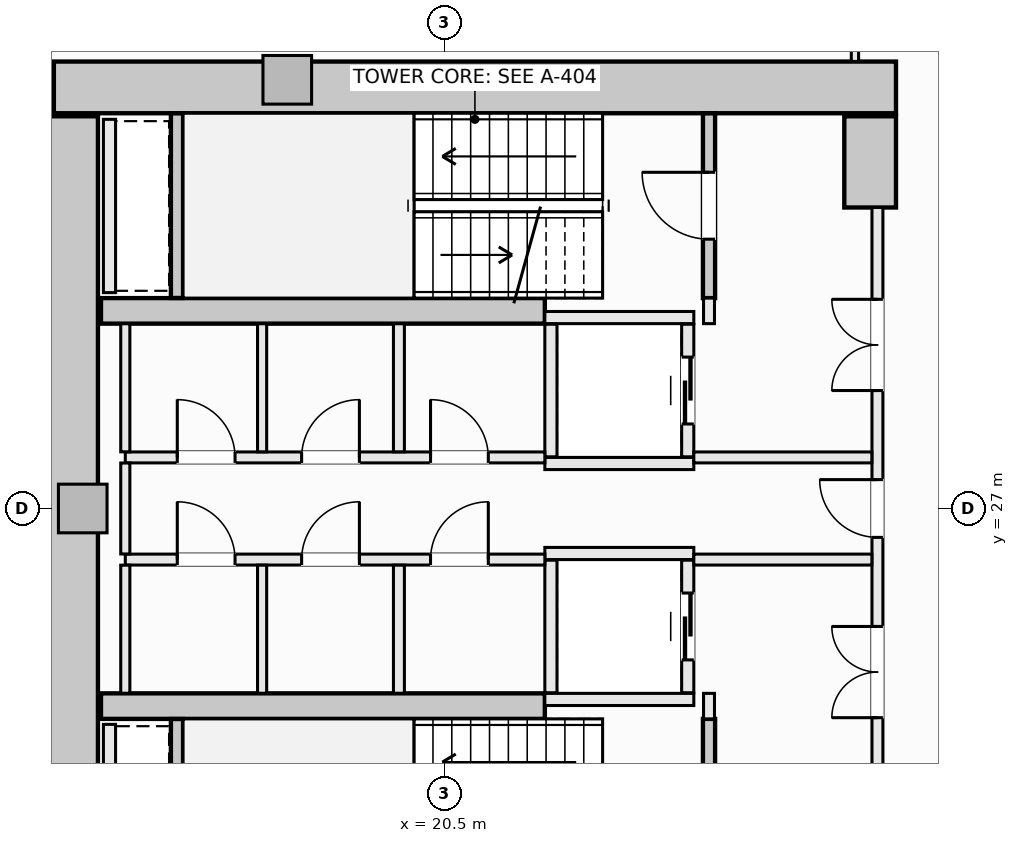
"""IFC4 building model, lengths in metres.
Left out: names, types, materials, properties, quantities, classifications, styles, units other than length and angle.
Written with IfcOpenShell. Run it as: python <this file> out.ifc"""

import sys

from ifc_helpers import new_model, si_unit, direction, frame, frame_2d, origin, origin_2d, place, context, subcontext, project, spatial, rectangle, extrude, element, fill, save


model = new_model("IFC4")
c1 = context("Model", 3, precision=1e-05, world=origin(), true_north=direction((0.0, 1.0)))
c2 = subcontext(c1, "Body", "Model", "MODEL_VIEW")
j1 = project(units=[si_unit("LENGTHUNIT", "METRE"), si_unit("PLANEANGLEUNIT", "RADIAN")], contexts=[c1])
p1 = place(None, origin())
s1 = spatial("IfcSite", under=j1, at=p1, CompositionType="ELEMENT")
p2 = place(p1, origin())
s2 = spatial("IfcBuilding", under=s1, at=p2, CompositionType="ELEMENT")
p3 = place(p2, frame((0.0, 0.0, 68.85)))
s3 = spatial("IfcBuildingStorey", under=s2, at=p3, CompositionType="ELEMENT", Elevation=68.85)
p4 = place(p3, frame((14.075, 33.925, -0.28), z_axis=(0.0, 0.0, 1.0), x_axis=(1.0, 0.0, 0.0)))
e1 = element("IfcWall", 1, at=p4, inside=s3, PredefinedType="SHEAR", context=c2, shape_type="SweptSolid", body=[
    extrude(rectangle(XDim=13.85, YDim=0.85, at=frame_2d((6.925, 0.0))), origin(), (0.0, 0.0, 1.0), 3.85),
])
p5 = place(p3, frame((14.375, 20.55, -0.28), z_axis=(0.0, 0.0, 1.0), x_axis=(0.0, 1.0, 0.0)))
e2 = element("IfcWall", 2, at=p5, inside=s3, PredefinedType="SHEAR", context=c2, shape_type="SweptSolid", body=[
    extrude(rectangle(XDim=12.9, YDim=0.85, at=frame_2d((6.45, 0.0))), origin(), (0.0, 0.0, 1.0), 3.85),
])
p6 = place(p3, frame((27.5, 31.95, -0.28), z_axis=(0.0, 0.0, 1.0), x_axis=(0.0, 1.0, 0.0)))
e3 = element("IfcWall", 3, at=p6, inside=s3, PredefinedType="SHEAR", context=c2, shape_type="SweptSolid", body=[
    extrude(rectangle(XDim=1.5, YDim=0.85, at=frame_2d((0.75, 0.0))), origin(), (0.0, 0.0, 1.0), 3.85),
])
for number, where, z_axis, x_axis in (
    (4, (14.85, 30.25, -0.28), (0.0, 0.0, 1.0), (1.0, 0.0, 0.0)),
    (5, (14.85, 23.75, -0.28), (0.0, 0.0, 1.0), (1.0, 0.0, 0.0)),
):
    element("IfcWall", number, at=place(p3, frame(where, z_axis=z_axis, x_axis=x_axis)), inside=s3, PredefinedType="SHEAR", context=c2, shape_type="SweptSolid", body=[
        extrude(rectangle(XDim=7.3, YDim=0.42, at=frame_2d((3.65, 0.0))), origin(), (0.0, 0.0, 1.0), 3.85),
    ])
for number, where, z_axis, x_axis in (
    (6, (17.914, 34.05, -0.28), (0.0, 0.0, 1.0), (1.0, 0.0, 0.0)),
    (7, (14.55, 27.0, -0.28), (0.0, 0.0, 1.0), (1.0, 0.0, 0.0)),
):
    element("IfcColumn", number, at=place(p3, frame(where, z_axis=z_axis, x_axis=x_axis)), inside=s3, PredefinedType="PILASTER", context=c2, shape_type="SweptSolid", body=[
        extrude(rectangle(XDim=0.8, YDim=0.8, at=origin_2d()), origin(), (0.0, 0.0, 1.0), 3.85),
    ])
p7 = place(p3, frame((24.85, 30.46, -0.28), z_axis=(0.0, 0.0, 1.0), x_axis=(0.0, 1.0, 0.0)))
e8 = element("IfcWall", 8, at=p7, inside=s3, PredefinedType="SHEAR", context=c2, shape_type="SweptSolid", body=[
    extrude(rectangle(XDim=3.038, YDim=0.2, at=frame_2d((1.519, 0.0))), origin(), (0.0, 0.0, 1.0), 3.85),
])
p8 = place(p7, frame((0.969, 0.0, 0.28)))
e9 = element("IfcOpeningElement", 9, at=p8, cuts=e8, PredefinedType="OPENING", context=c2, shape_type="SweptSolid", body=[
    extrude(rectangle(XDim=1.1, YDim=2.15, at=frame_2d((0.55, 1.075))), frame((0.0, 0.11, 0.0), z_axis=(0.0, -1.0, 0.0), x_axis=(1.0, 0.0, 0.0)), (0.0, 0.0, 1.0), 0.22),
])
p9 = place(p3, frame((16.1, 30.462, -0.28), z_axis=(0.0, 0.0, 1.0), x_axis=(0.0, 1.0, 0.0)))
e10 = element("IfcWall", 10, at=p9, inside=s3, PredefinedType="SHEAR", context=c2, shape_type="SweptSolid", body=[
    extrude(rectangle(XDim=3.036, YDim=0.2, at=frame_2d((1.518, 0.0))), origin(), (0.0, 0.0, 1.0), 3.85),
])
p10 = place(p3, frame((24.85, 20.502, -0.28), z_axis=(0.0, 0.0, 1.0), x_axis=(0.0, 1.0, 0.0)))
e11 = element("IfcWall", 11, at=p10, inside=s3, PredefinedType="SHEAR", context=c2, shape_type="SweptSolid", body=[
    extrude(rectangle(XDim=3.038, YDim=0.2, at=frame_2d((1.519, 0.0))), origin(), (0.0, 0.0, 1.0), 3.85),
])
p11 = place(p10, frame((0.969, 0.0, 0.28)))
e12 = element("IfcOpeningElement", 12, at=p11, cuts=e11, PredefinedType="OPENING", context=c2, shape_type="SweptSolid", body=[
    extrude(rectangle(XDim=1.1, YDim=2.15, at=frame_2d((0.55, 1.075))), frame((0.0, 0.11, 0.0), z_axis=(0.0, -1.0, 0.0), x_axis=(1.0, 0.0, 0.0)), (0.0, 0.0, 1.0), 0.22),
])
p12 = place(p3, frame((16.1, 20.502, -0.28), z_axis=(0.0, 0.0, 1.0), x_axis=(0.0, 1.0, 0.0)))
e13 = element("IfcWall", 13, at=p12, inside=s3, PredefinedType="SHEAR", context=c2, shape_type="SweptSolid", body=[
    extrude(rectangle(XDim=3.036, YDim=0.2, at=frame_2d((1.518, 0.0))), origin(), (0.0, 0.0, 1.0), 3.85),
])
for number, where, z_axis, x_axis in (
    (14, (22.15, 30.14, 0.0), (0.0, 0.0, 1.0), (1.0, 0.0, 0.0)),
    (15, (22.15, 27.74, 0.0), (0.0, 0.0, 1.0), (1.0, 0.0, 0.0)),
):
    element("IfcWall", number, at=place(p3, frame(where, z_axis=z_axis, x_axis=x_axis)), inside=s3, PredefinedType="SOLIDWALL", context=c2, shape_type="SweptSolid", body=[
        extrude(rectangle(XDim=2.45, YDim=0.2, at=frame_2d((1.225, 0.0))), origin(), (0.0, 0.0, 1.0), 3.57),
    ])
p13 = place(p3, frame((22.25, 27.85, 0.0), z_axis=(0.0, 0.0, 1.0), x_axis=(0.0, 1.0, 0.0)))
e16 = element("IfcWall", 16, at=p13, inside=s3, PredefinedType="SOLIDWALL", context=c2, shape_type="SweptSolid", body=[
    extrude(rectangle(XDim=2.18, YDim=0.2, at=frame_2d((1.09, 0.0))), origin(), (0.0, 0.0, 1.0), 3.57),
])
p14 = place(p3, frame((24.5, 27.85, 0.0), z_axis=(0.0, 0.0, 1.0), x_axis=(0.0, 1.0, 0.0)))
e17 = element("IfcWall", 17, at=p14, inside=s3, PredefinedType="SOLIDWALL", context=c2, shape_type="SweptSolid", body=[
    extrude(rectangle(XDim=2.18, YDim=0.2, at=frame_2d((1.09, 0.0))), origin(), (0.0, 0.0, 1.0), 3.57),
])
p15 = place(p14, frame((0.54, 0.0, 0.0)))
e18 = element("IfcOpeningElement", 18, at=p15, cuts=e17, PredefinedType="OPENING", context=c2, shape_type="SweptSolid", body=[
    extrude(rectangle(XDim=1.1, YDim=2.2, at=frame_2d((0.55, 1.1))), frame((0.0, 0.11, 0.0), z_axis=(0.0, -1.0, 0.0), x_axis=(1.0, 0.0, 0.0)), (0.0, 0.0, 1.0), 0.22),
])
for number, where, z_axis, x_axis in (
    (19, (22.15, 26.26, 0.0), (0.0, 0.0, 1.0), (1.0, 0.0, 0.0)),
    (20, (22.15, 23.86, 0.0), (0.0, 0.0, 1.0), (1.0, 0.0, 0.0)),
):
    element("IfcWall", number, at=place(p3, frame(where, z_axis=z_axis, x_axis=x_axis)), inside=s3, PredefinedType="SOLIDWALL", context=c2, shape_type="SweptSolid", body=[
        extrude(rectangle(XDim=2.45, YDim=0.2, at=frame_2d((1.225, 0.0))), origin(), (0.0, 0.0, 1.0), 3.57),
    ])
p16 = place(p3, frame((22.25, 23.97, 0.0), z_axis=(0.0, 0.0, 1.0), x_axis=(0.0, 1.0, 0.0)))
e21 = element("IfcWall", 21, at=p16, inside=s3, PredefinedType="SOLIDWALL", context=c2, shape_type="SweptSolid", body=[
    extrude(rectangle(XDim=2.18, YDim=0.2, at=frame_2d((1.09, 0.0))), origin(), (0.0, 0.0, 1.0), 3.57),
])
p17 = place(p3, frame((24.5, 23.97, 0.0), z_axis=(0.0, 0.0, 1.0), x_axis=(0.0, 1.0, 0.0)))
e22 = element("IfcWall", 22, at=p17, inside=s3, PredefinedType="SOLIDWALL", context=c2, shape_type="SweptSolid", body=[
    extrude(rectangle(XDim=2.18, YDim=0.2, at=frame_2d((1.09, 0.0))), origin(), (0.0, 0.0, 1.0), 3.57),
])
p18 = place(p17, frame((0.54, 0.0, 0.0)))
e23 = element("IfcOpeningElement", 23, at=p18, cuts=e22, PredefinedType="OPENING", context=c2, shape_type="SweptSolid", body=[
    extrude(rectangle(XDim=1.1, YDim=2.2, at=frame_2d((0.55, 1.1))), frame((0.0, 0.11, 0.0), z_axis=(0.0, -1.0, 0.0), x_axis=(1.0, 0.0, 0.0)), (0.0, 0.0, 1.0), 0.22),
])
for number, where, z_axis, x_axis in (
    (24, (14.99, 30.55, 0.0), (0.0, 0.0, 1.0), (0.0, 1.0, 0.0)),
    (25, (14.99, 20.6, 0.0), (0.0, 0.0, 1.0), (0.0, 1.0, 0.0)),
):
    element("IfcWall", number, at=place(p3, frame(where, z_axis=z_axis, x_axis=x_axis)), inside=s3, PredefinedType="SOLIDWALL", context=c2, shape_type="SweptSolid", body=[
        extrude(rectangle(XDim=2.85, YDim=0.2, at=frame_2d((1.425, 0.0))), origin(), (0.0, 0.0, 1.0), 3.57),
    ])
for number, where, z_axis, x_axis in (
    (26, (24.85, 23.54, 0.0), (0.0, 0.0, 1.0), (0.0, 1.0, 0.0)),
    (27, (24.85, 30.04, 0.0), (0.0, 0.0, 1.0), (0.0, 1.0, 0.0)),
):
    element("IfcWall", number, at=place(p3, frame(where, z_axis=z_axis, x_axis=x_axis)), inside=s3, PredefinedType="SOLIDWALL", context=c2, shape_type="SweptSolid", body=[
        extrude(rectangle(XDim=0.42, YDim=0.18, at=frame_2d((0.21, 0.0))), origin(), (0.0, 0.0, 1.0), 3.57),
    ])
p19 = place(p3, frame((27.62, 22.05, 0.0), z_axis=(0.0, 0.0, 1.0), x_axis=(0.0, 1.0, 0.0)))
e28 = element("IfcWall", 28, at=p19, inside=s3, PredefinedType="SOLIDWALL", context=c2, shape_type="SweptSolid", body=[
    extrude(rectangle(XDim=9.9, YDim=0.18, at=frame_2d((4.95, 0.0))), origin(), (0.0, 0.0, 1.0), 2.662),
])
p20 = place(p19, frame((4.475, 0.0, 0.0)))
e29 = element("IfcOpeningElement", 29, at=p20, cuts=e28, PredefinedType="OPENING", context=c2, shape_type="SweptSolid", body=[
    extrude(rectangle(XDim=0.95, YDim=2.1, at=frame_2d((0.475, 1.05))), frame((0.0, 0.1, 0.0), z_axis=(0.0, -1.0, 0.0), x_axis=(1.0, 0.0, 0.0)), (0.0, 0.0, 1.0), 0.2),
])
p21 = place(p19, frame((6.89, 0.0, 0.0)))
e30 = element("IfcOpeningElement", 30, at=p21, cuts=e28, PredefinedType="OPENING", context=c2, shape_type="SweptSolid", body=[
    extrude(rectangle(XDim=1.5, YDim=2.2, at=frame_2d((0.75, 1.1))), frame((0.0, 0.1, 0.0), z_axis=(0.0, -1.0, 0.0), x_axis=(1.0, 0.0, 0.0)), (0.0, 0.0, 1.0), 0.2),
])
p22 = place(p19, frame((1.51, 0.0, 0.0)))
e31 = element("IfcOpeningElement", 31, at=p22, cuts=e28, PredefinedType="OPENING", context=c2, shape_type="SweptSolid", body=[
    extrude(rectangle(XDim=1.5, YDim=2.2, at=frame_2d((0.75, 1.1))), frame((0.0, 0.1, 0.0), z_axis=(0.0, -1.0, 0.0), x_axis=(1.0, 0.0, 0.0)), (0.0, 0.0, 1.0), 0.2),
])
p23 = place(p3, frame((15.25, 27.84, 0.0), z_axis=(0.0, 0.0, 1.0), x_axis=(1.0, 0.0, 0.0)))
e32 = element("IfcWall", 32, at=p23, inside=s3, PredefinedType="SOLIDWALL", context=c2, shape_type="SweptSolid", body=[
    extrude(rectangle(XDim=6.9, YDim=0.18, at=frame_2d((3.45, 0.0))), origin(), (0.0, 0.0, 1.0), 3.57),
])
p24 = place(p23, frame((5.02, 0.0, 0.0)))
e33 = element("IfcOpeningElement", 33, at=p24, cuts=e32, PredefinedType="OPENING", context=c2, shape_type="SweptSolid", body=[
    extrude(rectangle(XDim=0.95, YDim=2.1, at=frame_2d((0.475, 1.05))), frame((0.0, 0.1, 0.0), z_axis=(0.0, -1.0, 0.0), x_axis=(1.0, 0.0, 0.0)), (0.0, 0.0, 1.0), 0.2),
])
p25 = place(p23, frame((0.855, 0.0, 0.0)))
e34 = element("IfcOpeningElement", 34, at=p25, cuts=e32, PredefinedType="OPENING", context=c2, shape_type="SweptSolid", body=[
    extrude(rectangle(XDim=0.95, YDim=2.1, at=frame_2d((0.475, 1.05))), frame((0.0, 0.1, 0.0), z_axis=(0.0, -1.0, 0.0), x_axis=(1.0, 0.0, 0.0)), (0.0, 0.0, 1.0), 0.2),
])
p26 = place(p23, frame((2.9, 0.0, 0.0)))
e35 = element("IfcOpeningElement", 35, at=p26, cuts=e32, PredefinedType="OPENING", context=c2, shape_type="SweptSolid", body=[
    extrude(rectangle(XDim=0.95, YDim=2.1, at=frame_2d((0.475, 1.05))), frame((0.0, 0.1, 0.0), z_axis=(0.0, -1.0, 0.0), x_axis=(1.0, 0.0, 0.0)), (0.0, 0.0, 1.0), 0.2),
])
p27 = place(p3, frame((24.6, 27.84, 0.0), z_axis=(0.0, 0.0, 1.0), x_axis=(1.0, 0.0, 0.0)))
e36 = element("IfcWall", 36, at=p27, inside=s3, PredefinedType="SOLIDWALL", context=c2, shape_type="SweptSolid", body=[
    extrude(rectangle(XDim=2.928, YDim=0.18, at=frame_2d((1.464, 0.0))), origin(), (0.0, 0.0, 1.0), 3.57),
])
p28 = place(p3, frame((15.25, 26.16, 0.0), z_axis=(0.0, 0.0, 1.0), x_axis=(1.0, 0.0, 0.0)))
e37 = element("IfcWall", 37, at=p28, inside=s3, PredefinedType="SOLIDWALL", context=c2, shape_type="SweptSolid", body=[
    extrude(rectangle(XDim=6.9, YDim=0.18, at=frame_2d((3.45, 0.0))), origin(), (0.0, 0.0, 1.0), 3.57),
])
p29 = place(p28, frame((5.02, 0.0, 0.0)))
e38 = element("IfcOpeningElement", 38, at=p29, cuts=e37, PredefinedType="OPENING", context=c2, shape_type="SweptSolid", body=[
    extrude(rectangle(XDim=0.95, YDim=2.1, at=frame_2d((0.475, 1.05))), frame((0.0, 0.1, 0.0), z_axis=(0.0, -1.0, 0.0), x_axis=(1.0, 0.0, 0.0)), (0.0, 0.0, 1.0), 0.2),
])
p30 = place(p28, frame((0.855, 0.0, 0.0)))
e39 = element("IfcOpeningElement", 39, at=p30, cuts=e37, PredefinedType="OPENING", context=c2, shape_type="SweptSolid", body=[
    extrude(rectangle(XDim=0.95, YDim=2.1, at=frame_2d((0.475, 1.05))), frame((0.0, 0.1, 0.0), z_axis=(0.0, -1.0, 0.0), x_axis=(1.0, 0.0, 0.0)), (0.0, 0.0, 1.0), 0.2),
])
p31 = place(p28, frame((2.9, 0.0, 0.0)))
e40 = element("IfcOpeningElement", 40, at=p31, cuts=e37, PredefinedType="OPENING", context=c2, shape_type="SweptSolid", body=[
    extrude(rectangle(XDim=0.95, YDim=2.1, at=frame_2d((0.475, 1.05))), frame((0.0, 0.1, 0.0), z_axis=(0.0, -1.0, 0.0), x_axis=(1.0, 0.0, 0.0)), (0.0, 0.0, 1.0), 0.2),
])
p32 = place(p3, frame((24.6, 26.16, 0.0), z_axis=(0.0, 0.0, 1.0), x_axis=(1.0, 0.0, 0.0)))
e41 = element("IfcWall", 41, at=p32, inside=s3, PredefinedType="SOLIDWALL", context=c2, shape_type="SweptSolid", body=[
    extrude(rectangle(XDim=2.928, YDim=0.18, at=frame_2d((1.464, 0.0))), origin(), (0.0, 0.0, 1.0), 3.57),
])
p33 = place(p3, frame((15.25, 23.962, 0.0), z_axis=(0.0, 0.0, 1.0), x_axis=(0.0, 1.0, 0.0)))
e42 = element("IfcWall", 42, at=p33, inside=s3, PredefinedType="PARTITIONING", context=c2, shape_type="SweptSolid", body=[
    extrude(rectangle(XDim=2.106, YDim=0.15, at=frame_2d((1.053, 0.0))), origin(), (0.0, 0.0, 1.0), 3.57),
])
p34 = place(p3, frame((15.25, 26.252, 0.0), z_axis=(0.0, 0.0, 1.0), x_axis=(0.0, 1.0, 0.0)))
e43 = element("IfcWall", 43, at=p34, inside=s3, PredefinedType="PARTITIONING", context=c2, shape_type="SweptSolid", body=[
    extrude(rectangle(XDim=1.496, YDim=0.15, at=frame_2d((0.748, 0.0))), origin(), (0.0, 0.0, 1.0), 3.57),
])
p35 = place(p3, frame((15.25, 27.932, 0.0), z_axis=(0.0, 0.0, 1.0), x_axis=(0.0, 1.0, 0.0)))
e44 = element("IfcWall", 44, at=p35, inside=s3, PredefinedType="PARTITIONING", context=c2, shape_type="SweptSolid", body=[
    extrude(rectangle(XDim=2.106, YDim=0.15, at=frame_2d((1.053, 0.0))), origin(), (0.0, 0.0, 1.0), 3.57),
])
for number, where, z_axis, x_axis in (
    (45, (19.75, 23.962, 0.0), (0.0, 0.0, 1.0), (0.0, 1.0, 0.0)),
    (46, (19.75, 27.932, 0.0), (0.0, 0.0, 1.0), (0.0, 1.0, 0.0)),
):
    element("IfcWall", number, at=place(p3, frame(where, z_axis=z_axis, x_axis=x_axis)), inside=s3, PredefinedType="SOLIDWALL", context=c2, shape_type="SweptSolid", body=[
        extrude(rectangle(XDim=2.106, YDim=0.18, at=frame_2d((1.053, 0.0))), origin(), (0.0, 0.0, 1.0), 3.57),
    ])
for number, where, z_axis, x_axis in (
    (47, (17.5, 23.962, 0.0), (0.0, 0.0, 1.0), (0.0, 1.0, 0.0)),
    (48, (17.5, 27.932, 0.0), (0.0, 0.0, 1.0), (0.0, 1.0, 0.0)),
):
    element("IfcWall", number, at=place(p3, frame(where, z_axis=z_axis, x_axis=x_axis)), inside=s3, PredefinedType="PARTITIONING", context=c2, shape_type="SweptSolid", body=[
        extrude(rectangle(XDim=2.106, YDim=0.15, at=frame_2d((1.053, 0.0))), origin(), (0.0, 0.0, 1.0), 3.57),
    ])
p36 = place(p3, frame((27.25, 34.352, 0.0), z_axis=(0.0, 0.0, 1.0), x_axis=(0.0, 1.0, 0.0)))
e49 = element("IfcWall", 49, at=p36, inside=s3, PredefinedType="PARTITIONING", context=c2, shape_type="SweptSolid", body=[
    extrude(rectangle(XDim=0.606, YDim=0.12, at=frame_2d((0.303, 0.0))), origin(), (0.0, 0.0, 1.0), 3.57),
])
p37 = place(p8, origin())
e50 = element("IfcDoor", 50, at=p37, inside=s3, OperationType="SINGLE_SWING_RIGHT", PredefinedType="DOOR", context=c2, shape_type="SweptSolid", body=[
    extrude(rectangle(XDim=1.1, YDim=2.15, at=frame_2d((0.55, 1.075))), frame((0.0, 0.025, 0.0), z_axis=(0.0, -1.0, 0.0), x_axis=(1.0, 0.0, 0.0)), (0.0, 0.0, 1.0), 0.05),
])
fill(e9, e50)
p38 = place(p15, origin())
e51 = element("IfcDoor", 51, at=p38, inside=s3, OperationType="SLIDING_TO_LEFT", PredefinedType="DOOR", context=c2, shape_type="SweptSolid", body=[
    extrude(rectangle(XDim=1.1, YDim=2.2, at=frame_2d((0.55, 1.1))), frame((0.0, 0.025, 0.0), z_axis=(0.0, -1.0, 0.0), x_axis=(1.0, 0.0, 0.0)), (0.0, 0.0, 1.0), 0.05),
])
fill(e18, e51)
p39 = place(p18, origin())
e52 = element("IfcDoor", 52, at=p39, inside=s3, OperationType="SLIDING_TO_LEFT", PredefinedType="DOOR", context=c2, shape_type="SweptSolid", body=[
    extrude(rectangle(XDim=1.1, YDim=2.2, at=frame_2d((0.55, 1.1))), frame((0.0, 0.025, 0.0), z_axis=(0.0, -1.0, 0.0), x_axis=(1.0, 0.0, 0.0)), (0.0, 0.0, 1.0), 0.05),
])
fill(e23, e52)
p40 = place(p20, origin())
e53 = element("IfcDoor", 53, at=p40, inside=s3, OperationType="SINGLE_SWING_RIGHT", PredefinedType="DOOR", context=c2, shape_type="SweptSolid", body=[
    extrude(rectangle(XDim=0.95, YDim=2.1, at=frame_2d((0.475, 1.05))), frame((0.0, 0.025, 0.0), z_axis=(0.0, -1.0, 0.0), x_axis=(1.0, 0.0, 0.0)), (0.0, 0.0, 1.0), 0.05),
])
fill(e29, e53)
p41 = place(p21, origin())
e54 = element("IfcDoor", 54, at=p41, inside=s3, OperationType="DOUBLE_DOOR_SINGLE_SWING", PredefinedType="DOOR", context=c2, shape_type="SweptSolid", body=[
    extrude(rectangle(XDim=1.5, YDim=2.2, at=frame_2d((0.75, 1.1))), frame((0.0, 0.025, 0.0), z_axis=(0.0, -1.0, 0.0), x_axis=(1.0, 0.0, 0.0)), (0.0, 0.0, 1.0), 0.05),
])
fill(e30, e54)
p42 = place(p22, origin())
e55 = element("IfcDoor", 55, at=p42, inside=s3, OperationType="DOUBLE_DOOR_SINGLE_SWING", PredefinedType="DOOR", context=c2, shape_type="SweptSolid", body=[
    extrude(rectangle(XDim=1.5, YDim=2.2, at=frame_2d((0.75, 1.1))), frame((0.0, 0.025, 0.0), z_axis=(0.0, -1.0, 0.0), x_axis=(1.0, 0.0, 0.0)), (0.0, 0.0, 1.0), 0.05),
])
fill(e31, e55)
p43 = place(p24, origin())
e56 = element("IfcDoor", 56, at=p43, inside=s3, OperationType="SINGLE_SWING_LEFT", PredefinedType="DOOR", context=c2, shape_type="SweptSolid", body=[
    extrude(rectangle(XDim=0.95, YDim=2.1, at=frame_2d((0.475, 1.05))), frame((0.0, 0.025, 0.0), z_axis=(0.0, -1.0, 0.0), x_axis=(1.0, 0.0, 0.0)), (0.0, 0.0, 1.0), 0.05),
])
fill(e33, e56)
p44 = place(p29, origin())
e57 = element("IfcDoor", 57, at=p44, inside=s3, OperationType="SINGLE_SWING_RIGHT", PredefinedType="DOOR", context=c2, shape_type="SweptSolid", body=[
    extrude(rectangle(XDim=0.95, YDim=2.1, at=frame_2d((0.475, 1.05))), frame((0.0, 0.025, 0.0), z_axis=(0.0, -1.0, 0.0), x_axis=(1.0, 0.0, 0.0)), (0.0, 0.0, 1.0), 0.05),
])
fill(e38, e57)
p45 = place(p25, origin())
e58 = element("IfcDoor", 58, at=p45, inside=s3, OperationType="SINGLE_SWING_LEFT", PredefinedType="DOOR", context=c2, shape_type="SweptSolid", body=[
    extrude(rectangle(XDim=0.95, YDim=2.1, at=frame_2d((0.475, 1.05))), frame((0.0, 0.025, 0.0), z_axis=(0.0, -1.0, 0.0), x_axis=(1.0, 0.0, 0.0)), (0.0, 0.0, 1.0), 0.05),
])
fill(e34, e58)
p46 = place(p26, origin())
e59 = element("IfcDoor", 59, at=p46, inside=s3, OperationType="SINGLE_SWING_RIGHT", PredefinedType="DOOR", context=c2, shape_type="SweptSolid", body=[
    extrude(rectangle(XDim=0.95, YDim=2.1, at=frame_2d((0.475, 1.05))), frame((0.0, 0.025, 0.0), z_axis=(0.0, -1.0, 0.0), x_axis=(1.0, 0.0, 0.0)), (0.0, 0.0, 1.0), 0.05),
])
fill(e35, e59)
p47 = place(p30, origin())
e60 = element("IfcDoor", 60, at=p47, inside=s3, OperationType="SINGLE_SWING_LEFT", PredefinedType="DOOR", context=c2, shape_type="SweptSolid", body=[
    extrude(rectangle(XDim=0.95, YDim=2.1, at=frame_2d((0.475, 1.05))), frame((0.0, 0.025, 0.0), z_axis=(0.0, -1.0, 0.0), x_axis=(1.0, 0.0, 0.0)), (0.0, 0.0, 1.0), 0.05),
])
fill(e39, e60)
p48 = place(p31, origin())
e61 = element("IfcDoor", 61, at=p48, inside=s3, OperationType="SINGLE_SWING_RIGHT", PredefinedType="DOOR", context=c2, shape_type="SweptSolid", body=[
    extrude(rectangle(XDim=0.95, YDim=2.1, at=frame_2d((0.475, 1.05))), frame((0.0, 0.025, 0.0), z_axis=(0.0, -1.0, 0.0), x_axis=(1.0, 0.0, 0.0)), (0.0, 0.0, 1.0), 0.05),
])
fill(e40, e61)
save(model, sys.argv[1])
